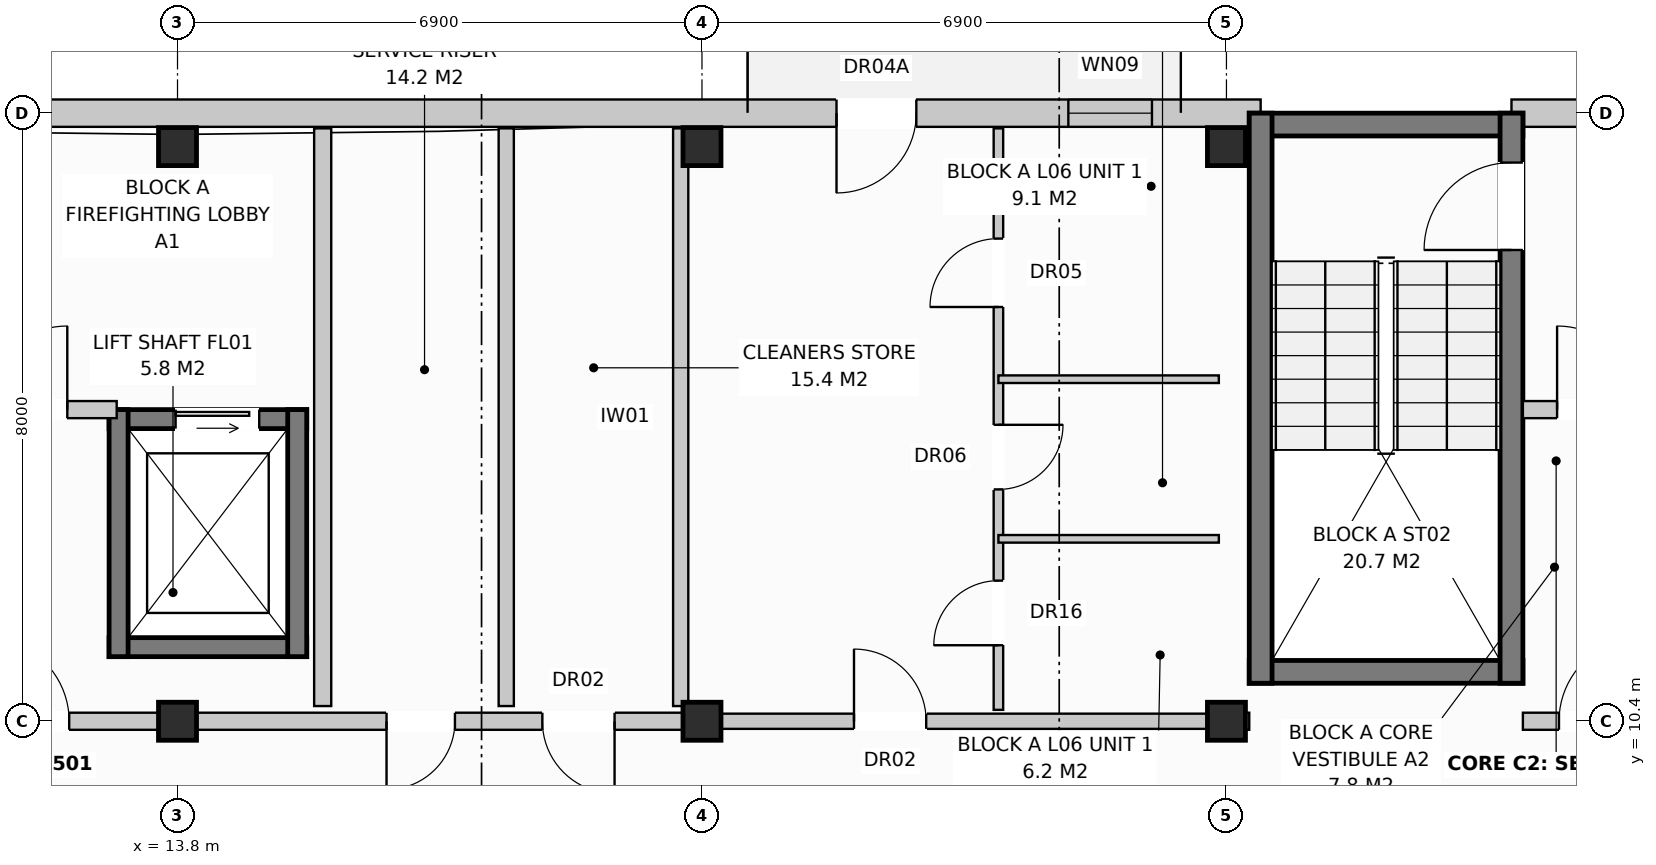
"""IFC4 building model, lengths in metres.
Left out: names, types, materials, properties, quantities, classifications, styles, units other than length and angle.
Written with IfcOpenShell. Run it as: python <this file> out.ifc"""

import sys

from ifc_helpers import new_model, si_unit, direction, frame, frame_2d, origin, origin_with_axes, origin_2d, place, context, subcontext, project, spatial, rectangle, extrude, element, fill, save


model = new_model("IFC4")
c1 = context("Model", 3, precision=1e-05, world=origin(), true_north=direction((0.0, 1.0)))
c2 = subcontext(c1, "Body", "Model", "MODEL_VIEW")
j1 = project(units=[si_unit("LENGTHUNIT", "METRE"), si_unit("PLANEANGLEUNIT", "RADIAN")], contexts=[c1])
p1 = place(None, origin())
s1 = spatial("IfcSite", under=j1, at=p1, CompositionType="ELEMENT")
p2 = place(p1, origin())
s2 = spatial("IfcBuilding", under=s1, at=p2, CompositionType="ELEMENT")
p3 = place(p2, frame((0.0, 0.0, 20.8)))
s3 = spatial("IfcBuildingStorey", under=s2, at=p3, CompositionType="ELEMENT", Elevation=20.8)
for number, where, z_axis, x_axis in (
    (1, (13.8, 10.4, 0.0), (0.0, 0.0, 1.0), (1.0, 0.0, 0.0)),
    (2, (13.8, 17.96, 0.0), (0.0, 0.0, 1.0), (1.0, 0.0, 0.0)),
    (3, (20.7, 10.4, 0.0), (0.0, 0.0, 1.0), (1.0, 0.0, 0.0)),
    (4, (20.7, 17.96, 0.0), (0.0, 0.0, 1.0), (1.0, 0.0, 0.0)),
    (5, (27.6, 10.4, 0.0), (0.0, 0.0, 1.0), (1.0, 0.0, 0.0)),
    (6, (27.6, 17.96, 0.0), (0.0, 0.0, 1.0), (1.0, 0.0, 0.0)),
):
    element("IfcColumn", number, at=place(p3, frame(where, z_axis=z_axis, x_axis=x_axis)), inside=s3, PredefinedType="COLUMN", context=c2, shape_type="SweptSolid", body=[
        extrude(rectangle(XDim=0.5, YDim=0.5, at=origin_2d()), origin(), (0.0, 0.0, 1.0), 3.2),
    ])
p4 = place(p3, frame((10.65, 18.4, 0.0), z_axis=(0.0, 0.0, 1.0), x_axis=(1.0, 0.0, 0.0)))
e7 = element("IfcWall", 7, at=p4, inside=s3, PredefinedType="STANDARD", context=c2, shape_type="SweptSolid", body=[
    extrude(rectangle(XDim=17.4, YDim=0.36, at=frame_2d((8.7, 0.0))), origin(), (0.0, 0.0, 1.0), 2.95),
])
p5 = place(p4, frame((11.82, 0.0, 0.0)))
e8 = element("IfcOpeningElement", 8, at=p5, cuts=e7, PredefinedType="OPENING", context=c2, shape_type="SweptSolid", body=[
    extrude(rectangle(XDim=1.05, YDim=2.12, at=frame_2d((0.525, 1.06))), frame((0.0, 0.192, 0.0), z_axis=(0.0, -1.0, 0.0), x_axis=(1.0, 0.0, 0.0)), (0.0, 0.0, 1.0), 0.384),
])
p6 = place(p4, frame((14.87, 0.0, 0.72)))
e9 = element("IfcOpeningElement", 9, at=p6, cuts=e7, PredefinedType="OPENING", context=c2, shape_type="SweptSolid", body=[
    extrude(rectangle(XDim=1.1, YDim=1.5, at=frame_2d((0.55, 0.75))), frame((0.0, 0.192, 0.0), z_axis=(0.0, -1.0, 0.0), x_axis=(1.0, 0.0, 0.0)), (0.0, 0.0, 1.0), 0.384),
])
p7 = place(p3, frame((31.35, 18.4, 0.0), z_axis=(0.0, 0.0, 1.0), x_axis=(1.0, 0.0, 0.0)))
e10 = element("IfcWall", 10, at=p7, inside=s3, PredefinedType="STANDARD", context=c2, shape_type="SweptSolid", body=[
    extrude(rectangle(XDim=23.68, YDim=0.36, at=frame_2d((11.84, 0.0))), origin(), (0.0, 0.0, 1.0), 2.95),
])
p8 = place(p7, frame((12.999, 0.0, 0.0)))
e11 = element("IfcOpeningElement", 11, at=p8, cuts=e10, PredefinedType="OPENING", context=c2, shape_type="SweptSolid", body=[
    extrude(rectangle(XDim=1.05, YDim=2.12, at=frame_2d((0.525, 1.06))), frame((0.0, 0.192, 0.0), z_axis=(0.0, -1.0, 0.0), x_axis=(1.0, 0.0, 0.0)), (0.0, 0.0, 1.0), 0.384),
])
p9 = place(p7, frame((10.87, 0.0, 0.8)))
e12 = element("IfcOpeningElement", 12, at=p9, cuts=e10, PredefinedType="OPENING", context=c2, shape_type="SweptSolid", body=[
    extrude(rectangle(XDim=1.9, YDim=1.85, at=frame_2d((0.95, 0.925))), frame((0.0, 0.192, 0.0), z_axis=(0.0, -1.0, 0.0), x_axis=(1.0, 0.0, 0.0)), (0.0, 0.0, 1.0), 0.384),
])
p10 = place(p7, frame((14.545, 0.0, 0.8)))
e13 = element("IfcOpeningElement", 13, at=p10, cuts=e10, PredefinedType="OPENING", context=c2, shape_type="SweptSolid", body=[
    extrude(rectangle(XDim=1.95, YDim=1.65, at=frame_2d((0.975, 0.825))), frame((0.0, 0.192, 0.0), z_axis=(0.0, -1.0, 0.0), x_axis=(1.0, 0.0, 0.0)), (0.0, 0.0, 1.0), 0.384),
])
p11 = place(p7, frame((20.67, 0.0, 0.72)))
e14 = element("IfcOpeningElement", 14, at=p11, cuts=e10, PredefinedType="OPENING", context=c2, shape_type="SweptSolid", body=[
    extrude(rectangle(XDim=1.1, YDim=1.5, at=frame_2d((0.55, 0.75))), frame((0.0, 0.192, 0.0), z_axis=(0.0, -1.0, 0.0), x_axis=(1.0, 0.0, 0.0)), (0.0, 0.0, 1.0), 0.384),
])
p12 = place(p3, frame((12.9, 14.375, 0.0), z_axis=(0.0, 0.0, 1.0), x_axis=(1.0, 0.0, 0.0)))
e15 = element("IfcWall", 15, at=p12, inside=s3, PredefinedType="SHEAR", context=c2, shape_type="SweptSolid", body=[
    extrude(rectangle(XDim=2.6, YDim=0.25, at=frame_2d((1.3, 0.0))), origin(), (0.0, 0.0, 1.0), 2.95),
])
p13 = place(p12, frame((0.875, 0.0, 0.0)))
e16 = element("IfcOpeningElement", 16, at=p13, cuts=e15, PredefinedType="OPENING", context=c2, shape_type="SweptSolid", body=[
    extrude(rectangle(XDim=1.1, YDim=2.1, at=frame_2d((0.55, 1.05))), frame((0.0, 0.137, 0.0), z_axis=(0.0, -1.0, 0.0), x_axis=(1.0, 0.0, 0.0)), (0.0, 0.0, 1.0), 0.274),
])
p14 = place(p3, frame((12.9, 11.375, 0.0), z_axis=(0.0, 0.0, 1.0), x_axis=(1.0, 0.0, 0.0)))
e17 = element("IfcWall", 17, at=p14, inside=s3, PredefinedType="SHEAR", context=c2, shape_type="SweptSolid", body=[
    extrude(rectangle(XDim=2.6, YDim=0.25, at=frame_2d((1.3, 0.0))), origin(), (0.0, 0.0, 1.0), 2.95),
])
for number, where, z_axis, x_axis in (
    (18, (13.025, 11.25, 0.0), (0.0, 0.0, 1.0), (0.0, 1.0, 0.0)),
    (19, (15.375, 11.25, 0.0), (0.0, 0.0, 1.0), (0.0, 1.0, 0.0)),
):
    element("IfcWall", number, at=place(p3, frame(where, z_axis=z_axis, x_axis=x_axis)), inside=s3, PredefinedType="SHEAR", context=c2, shape_type="SweptSolid", body=[
        extrude(rectangle(XDim=3.25, YDim=0.25, at=frame_2d((1.625, 0.0))), origin(), (0.0, 0.0, 1.0), 2.95),
    ])
p15 = place(p3, frame((15.71, 10.6, 0.0), z_axis=(0.0, 0.0, 1.0), x_axis=(0.0, 1.0, 0.0)))
e20 = element("IfcWall", 20, at=p15, inside=s3, PredefinedType="PARTITIONING", context=c2, shape_type="SweptSolid", body=[
    extrude(rectangle(XDim=7.6, YDim=0.225, at=frame_2d((3.8, 0.0))), origin(), (0.0, 0.0, 1.0), 2.59),
])
p16 = place(p3, frame((10.8, 14.5, 0.0), z_axis=(0.0, 0.0, 1.0), x_axis=(1.0, 0.0, 0.0)))
e21 = element("IfcWall", 21, at=p16, inside=s3, PredefinedType="PARTITIONING", context=c2, shape_type="SweptSolid", body=[
    extrude(rectangle(XDim=2.2, YDim=0.225, at=frame_2d((1.1, 0.0))), origin(), (0.0, 0.0, 1.0), 2.95),
])
p17 = place(p16, frame((0.45, 0.0, 0.0)))
e22 = element("IfcOpeningElement", 22, at=p17, cuts=e21, PredefinedType="OPENING", context=c2, shape_type="SweptSolid", body=[
    extrude(rectangle(XDim=1.1, YDim=2.15, at=frame_2d((0.55, 1.075))), frame((0.0, 0.125, 0.0), z_axis=(0.0, -1.0, 0.0), x_axis=(1.0, 0.0, 0.0)), (0.0, 0.0, 1.0), 0.249),
])
for number, where, z_axis, x_axis in (
    (23, (18.125, 10.6, 0.0), (0.0, 0.0, 1.0), (0.0, 1.0, 0.0)),
    (24, (20.42, 10.6, 0.0), (0.0, 0.0, 1.0), (0.0, 1.0, 0.0)),
):
    element("IfcWall", number, at=place(p3, frame(where, z_axis=z_axis, x_axis=x_axis)), inside=s3, PredefinedType="PARTITIONING", context=c2, shape_type="SweptSolid", body=[
        extrude(rectangle(XDim=7.6, YDim=0.2, at=frame_2d((3.8, 0.0))), origin(), (0.0, 0.0, 1.0), 2.95),
    ])
p18 = place(p3, frame((10.8, 10.4, 0.0), z_axis=(0.0, 0.0, 1.0), x_axis=(1.0, 0.0, 0.0)))
e25 = element("IfcWall", 25, at=p18, inside=s3, PredefinedType="PARTITIONING", context=c2, shape_type="SweptSolid", body=[
    extrude(rectangle(XDim=9.9, YDim=0.225, at=frame_2d((4.95, 0.0))), origin(), (0.0, 0.0, 1.0), 2.39),
])
p19 = place(p18, frame((0.475, 0.0, 0.0)))
e26 = element("IfcOpeningElement", 26, at=p19, cuts=e25, PredefinedType="OPENING", context=c2, shape_type="SweptSolid", body=[
    extrude(rectangle(XDim=1.1, YDim=2.15, at=frame_2d((0.55, 1.075))), frame((0.0, 0.125, 0.0), z_axis=(0.0, -1.0, 0.0), x_axis=(1.0, 0.0, 0.0)), (0.0, 0.0, 1.0), 0.249),
])
p20 = place(p18, frame((5.75, 0.0, 0.0)))
e27 = element("IfcOpeningElement", 27, at=p20, cuts=e25, PredefinedType="OPENING", context=c2, shape_type="SweptSolid", body=[
    extrude(rectangle(XDim=0.9, YDim=2.1, at=frame_2d((0.45, 1.05))), frame((0.0, 0.125, 0.0), z_axis=(0.0, -1.0, 0.0), x_axis=(1.0, 0.0, 0.0)), (0.0, 0.0, 1.0), 0.249),
])
p21 = place(p18, frame((7.8, 0.0, 0.0)))
e28 = element("IfcOpeningElement", 28, at=p21, cuts=e25, PredefinedType="OPENING", context=c2, shape_type="SweptSolid", body=[
    extrude(rectangle(XDim=0.95, YDim=2.15, at=frame_2d((0.475, 1.075))), frame((0.0, 0.125, 0.0), z_axis=(0.0, -1.0, 0.0), x_axis=(1.0, 0.0, 0.0)), (0.0, 0.0, 1.0), 0.249),
])
for number, where, z_axis, x_axis in (
    (29, (27.9, 18.25, 0.0), (0.0, 0.0, 1.0), (1.0, 0.0, 0.0)),
    (30, (27.9, 11.05, 0.0), (0.0, 0.0, 1.0), (1.0, 0.0, 0.0)),
):
    element("IfcWall", number, at=place(p3, frame(where, z_axis=z_axis, x_axis=x_axis)), inside=s3, PredefinedType="SHEAR", context=c2, shape_type="SweptSolid", body=[
        extrude(rectangle(XDim=3.6, YDim=0.3, at=frame_2d((1.8, 0.0))), origin(), (0.0, 0.0, 1.0), 2.95),
    ])
p22 = place(p3, frame((28.05, 10.9, 0.0), z_axis=(0.0, 0.0, 1.0), x_axis=(0.0, 1.0, 0.0)))
e31 = element("IfcWall", 31, at=p22, inside=s3, PredefinedType="SHEAR", context=c2, shape_type="SweptSolid", body=[
    extrude(rectangle(XDim=7.5, YDim=0.3, at=frame_2d((3.75, 0.0))), origin(), (0.0, 0.0, 1.0), 2.95),
])
p23 = place(p3, frame((31.35, 10.9, 0.0), z_axis=(0.0, 0.0, 1.0), x_axis=(0.0, 1.0, 0.0)))
e32 = element("IfcWall", 32, at=p23, inside=s3, PredefinedType="SHEAR", context=c2, shape_type="SweptSolid", body=[
    extrude(rectangle(XDim=7.5, YDim=0.3, at=frame_2d((3.75, 0.0))), origin(), (0.0, 0.0, 1.0), 2.95),
])
p24 = place(p23, frame((5.7, 0.0, 0.0)))
e33 = element("IfcOpeningElement", 33, at=p24, cuts=e32, PredefinedType="OPENING", context=c2, shape_type="SweptSolid", body=[
    extrude(rectangle(XDim=1.15, YDim=2.15, at=frame_2d((0.575, 1.075))), frame((0.0, 0.162, 0.0), z_axis=(0.0, -1.0, 0.0), x_axis=(1.0, 0.0, 0.0)), (0.0, 0.0, 1.0), 0.324),
])
p25 = place(p3, frame((31.5, 14.5, 0.0), z_axis=(0.0, 0.0, 1.0), x_axis=(1.0, 0.0, 0.0)))
e34 = element("IfcWall", 34, at=p25, inside=s3, PredefinedType="PARTITIONING", context=c2, shape_type="SweptSolid", body=[
    extrude(rectangle(XDim=2.2, YDim=0.225, at=frame_2d((1.1, 0.0))), origin(), (0.0, 0.0, 1.0), 2.95),
])
p26 = place(p25, frame((0.45, 0.0, 0.0)))
e35 = element("IfcOpeningElement", 35, at=p26, cuts=e34, PredefinedType="OPENING", context=c2, shape_type="SweptSolid", body=[
    extrude(rectangle(XDim=1.1, YDim=2.15, at=frame_2d((0.55, 1.075))), frame((0.0, 0.125, 0.0), z_axis=(0.0, -1.0, 0.0), x_axis=(1.0, 0.0, 0.0)), (0.0, 0.0, 1.0), 0.249),
])
p27 = place(p3, frame((27.6, 10.4, 0.0), z_axis=(0.0, 0.0, 1.0), x_axis=(1.0, 0.0, 0.0)))
e36 = element("IfcWall", 36, at=p27, inside=s3, PredefinedType="PARTITIONING", context=c2, shape_type="SweptSolid", body=[
    extrude(rectangle(XDim=0.3, YDim=0.225, at=frame_2d((0.15, 0.0))), origin(), (0.0, 0.0, 1.0), 2.95),
])
p28 = place(p3, frame((31.5, 10.4, 0.0), z_axis=(0.0, 0.0, 1.0), x_axis=(1.0, 0.0, 0.0)))
e37 = element("IfcWall", 37, at=p28, inside=s3, PredefinedType="PARTITIONING", context=c2, shape_type="SweptSolid", body=[
    extrude(rectangle(XDim=9.9, YDim=0.225, at=frame_2d((4.95, 0.0))), origin(), (0.0, 0.0, 1.0), 2.39),
])
p29 = place(p28, frame((0.475, 0.0, 0.0)))
e38 = element("IfcOpeningElement", 38, at=p29, cuts=e37, PredefinedType="OPENING", context=c2, shape_type="SweptSolid", body=[
    extrude(rectangle(XDim=1.1, YDim=2.15, at=frame_2d((0.55, 1.075))), frame((0.0, 0.125, 0.0), z_axis=(0.0, -1.0, 0.0), x_axis=(1.0, 0.0, 0.0)), (0.0, 0.0, 1.0), 0.249),
])
p30 = place(p28, frame((5.75, 0.0, 0.0)))
e39 = element("IfcOpeningElement", 39, at=p30, cuts=e37, PredefinedType="OPENING", context=c2, shape_type="SweptSolid", body=[
    extrude(rectangle(XDim=0.9, YDim=2.1, at=frame_2d((0.45, 1.05))), frame((0.0, 0.125, 0.0), z_axis=(0.0, -1.0, 0.0), x_axis=(1.0, 0.0, 0.0)), (0.0, 0.0, 1.0), 0.249),
])
p31 = place(p28, frame((7.8, 0.0, 0.0)))
e40 = element("IfcOpeningElement", 40, at=p31, cuts=e37, PredefinedType="OPENING", context=c2, shape_type="SweptSolid", body=[
    extrude(rectangle(XDim=0.95, YDim=2.15, at=frame_2d((0.475, 1.075))), frame((0.0, 0.125, 0.0), z_axis=(0.0, -1.0, 0.0), x_axis=(1.0, 0.0, 0.0)), (0.0, 0.0, 1.0), 0.249),
])
p32 = place(p3, frame((20.7, 10.4, 0.0), z_axis=(0.0, 0.0, 1.0), x_axis=(1.0, 0.0, 0.0)))
e41 = element("IfcWall", 41, at=p32, inside=s3, PredefinedType="PARTITIONING", context=c2, shape_type="SweptSolid", body=[
    extrude(rectangle(XDim=6.9, YDim=0.2, at=frame_2d((3.45, 0.0))), origin(), (0.0, 0.0, 1.0), 2.39),
])
p33 = place(p32, frame((2.0, 0.0, 0.0)))
e42 = element("IfcOpeningElement", 42, at=p33, cuts=e41, PredefinedType="OPENING", context=c2, shape_type="SweptSolid", body=[
    extrude(rectangle(XDim=0.95, YDim=2.15, at=frame_2d((0.475, 1.075))), frame((0.0, 0.112, 0.0), z_axis=(0.0, -1.0, 0.0), x_axis=(1.0, 0.0, 0.0)), (0.0, 0.0, 1.0), 0.224),
])
p34 = place(p3, frame((24.6, 10.55, 0.0), z_axis=(0.0, 0.0, 1.0), x_axis=(0.0, 1.0, 0.0)))
e43 = element("IfcWall", 43, at=p34, inside=s3, PredefinedType="PARTITIONING", context=c2, shape_type="SweptSolid", body=[
    extrude(rectangle(XDim=7.65, YDim=0.125, at=frame_2d((3.825, 0.0))), origin(), (0.0, 0.0, 1.0), 2.95),
])
p35 = place(p34, frame((0.85, 0.0, 0.0)))
e44 = element("IfcOpeningElement", 44, at=p35, cuts=e43, PredefinedType="OPENING", context=c2, shape_type="SweptSolid", body=[
    extrude(rectangle(XDim=0.85, YDim=2.1, at=frame_2d((0.425, 1.05))), frame((0.0, 0.074, 0.0), z_axis=(0.0, -1.0, 0.0), x_axis=(1.0, 0.0, 0.0)), (0.0, 0.0, 1.0), 0.149),
])
p36 = place(p34, frame((2.9, 0.0, 0.0)))
e45 = element("IfcOpeningElement", 45, at=p36, cuts=e43, PredefinedType="OPENING", context=c2, shape_type="SweptSolid", body=[
    extrude(rectangle(XDim=0.85, YDim=2.05, at=frame_2d((0.425, 1.025))), frame((0.0, 0.074, 0.0), z_axis=(0.0, -1.0, 0.0), x_axis=(1.0, 0.0, 0.0)), (0.0, 0.0, 1.0), 0.149),
])
p37 = place(p34, frame((5.3, 0.0, 0.0)))
e46 = element("IfcOpeningElement", 46, at=p37, cuts=e43, PredefinedType="OPENING", context=c2, shape_type="SweptSolid", body=[
    extrude(rectangle(XDim=0.9, YDim=2.1, at=frame_2d((0.45, 1.05))), frame((0.0, 0.074, 0.0), z_axis=(0.0, -1.0, 0.0), x_axis=(1.0, 0.0, 0.0)), (0.0, 0.0, 1.0), 0.149),
])
for number, where, z_axis, x_axis in (
    (47, (24.6, 12.8, 0.0), (0.0, 0.0, 1.0), (1.0, 0.0, 0.0)),
    (48, (24.6, 14.9, 0.0), (0.0, 0.0, 1.0), (1.0, 0.0, 0.0)),
):
    element("IfcWall", number, at=place(p3, frame(where, z_axis=z_axis, x_axis=x_axis)), inside=s3, PredefinedType="PARTITIONING", context=c2, shape_type="SweptSolid", body=[
        extrude(rectangle(XDim=2.9, YDim=0.1, at=frame_2d((1.45, 0.0))), origin(), (0.0, 0.0, 1.0), 2.95),
    ])
p38 = place(p5, frame((1.05, 0.0, 0.0), z_axis=(0.0, 0.0, 1.0), x_axis=(-1.0, 0.0, 0.0)))
e49 = element("IfcDoor", 49, at=p38, inside=s3, OperationType="SINGLE_SWING_LEFT", PredefinedType="DOOR", context=c2, shape_type="SweptSolid", body=[
    extrude(rectangle(XDim=1.05, YDim=2.12, at=frame_2d((0.525, 1.06))), frame((0.0, 0.025, 0.0), z_axis=(0.0, -1.0, 0.0), x_axis=(1.0, 0.0, 0.0)), (0.0, 0.0, 1.0), 0.05),
])
fill(e8, e49)
p39 = place(p6, origin_with_axes())
e50 = element("IfcWindow", 50, at=p39, inside=s3, PartitioningType="SINGLE_PANEL", PredefinedType="WINDOW", context=c2, shape_type="SweptSolid", body=[
    extrude(rectangle(XDim=1.1, YDim=1.5, at=frame_2d((0.55, 0.75))), frame((0.0, 0.03, 0.0), z_axis=(0.0, -1.0, 0.0), x_axis=(1.0, 0.0, 0.0)), (0.0, 0.0, 1.0), 0.06),
])
fill(e9, e50)
p40 = place(p13, origin_with_axes())
e51 = element("IfcDoor", 51, at=p40, inside=s3, OperationType="SLIDING_TO_LEFT", PredefinedType="DOOR", context=c2, shape_type="SweptSolid", body=[
    extrude(rectangle(XDim=1.1, YDim=2.1, at=frame_2d((0.55, 1.05))), frame((0.0, 0.025, 0.0), z_axis=(0.0, -1.0, 0.0), x_axis=(1.0, 0.0, 0.0)), (0.0, 0.0, 1.0), 0.05),
])
fill(e16, e51)
p41 = place(p17, origin_with_axes())
e52 = element("IfcDoor", 52, at=p41, inside=s3, OperationType="SINGLE_SWING_RIGHT", PredefinedType="DOOR", context=c2, shape_type="SweptSolid", body=[
    extrude(rectangle(XDim=1.1, YDim=2.15, at=frame_2d((0.55, 1.075))), frame((0.0, 0.025, 0.0), z_axis=(0.0, -1.0, 0.0), x_axis=(1.0, 0.0, 0.0)), (0.0, 0.0, 1.0), 0.05),
])
fill(e22, e52)
p42 = place(p19, origin_with_axes())
e53 = element("IfcDoor", 53, at=p42, inside=s3, OperationType="SINGLE_SWING_LEFT", PredefinedType="DOOR", context=c2, shape_type="SweptSolid", body=[
    extrude(rectangle(XDim=1.1, YDim=2.15, at=frame_2d((0.55, 1.075))), frame((0.0, 0.025, 0.0), z_axis=(0.0, -1.0, 0.0), x_axis=(1.0, 0.0, 0.0)), (0.0, 0.0, 1.0), 0.05),
])
fill(e26, e53)
p43 = place(p20, frame((0.9, 0.0, 0.0), z_axis=(0.0, 0.0, 1.0), x_axis=(-1.0, 0.0, 0.0)))
e54 = element("IfcDoor", 54, at=p43, inside=s3, OperationType="SINGLE_SWING_LEFT", PredefinedType="DOOR", context=c2, shape_type="SweptSolid", body=[
    extrude(rectangle(XDim=0.9, YDim=2.1, at=frame_2d((0.45, 1.05))), frame((0.0, 0.025, 0.0), z_axis=(0.0, -1.0, 0.0), x_axis=(1.0, 0.0, 0.0)), (0.0, 0.0, 1.0), 0.05),
])
fill(e27, e54)
p44 = place(p21, frame((0.95, 0.0, 0.0), z_axis=(0.0, 0.0, 1.0), x_axis=(-1.0, 0.0, 0.0)))
e55 = element("IfcDoor", 55, at=p44, inside=s3, OperationType="SINGLE_SWING_RIGHT", PredefinedType="DOOR", context=c2, shape_type="SweptSolid", body=[
    extrude(rectangle(XDim=0.95, YDim=2.15, at=frame_2d((0.475, 1.075))), frame((0.0, 0.025, 0.0), z_axis=(0.0, -1.0, 0.0), x_axis=(1.0, 0.0, 0.0)), (0.0, 0.0, 1.0), 0.05),
])
fill(e28, e55)
p45 = place(p24, origin_with_axes())
e56 = element("IfcDoor", 56, at=p45, inside=s3, OperationType="SINGLE_SWING_LEFT", PredefinedType="DOOR", context=c2, shape_type="SweptSolid", body=[
    extrude(rectangle(XDim=1.15, YDim=2.15, at=frame_2d((0.575, 1.075))), frame((0.0, 0.025, 0.0), z_axis=(0.0, -1.0, 0.0), x_axis=(1.0, 0.0, 0.0)), (0.0, 0.0, 1.0), 0.05),
])
fill(e33, e56)
p46 = place(p26, origin_with_axes())
e57 = element("IfcDoor", 57, at=p46, inside=s3, OperationType="SINGLE_SWING_LEFT", PredefinedType="DOOR", context=c2, shape_type="SweptSolid", body=[
    extrude(rectangle(XDim=1.1, YDim=2.15, at=frame_2d((0.55, 1.075))), frame((0.0, 0.025, 0.0), z_axis=(0.0, -1.0, 0.0), x_axis=(1.0, 0.0, 0.0)), (0.0, 0.0, 1.0), 0.05),
])
fill(e35, e57)
p47 = place(p29, origin_with_axes())
e58 = element("IfcDoor", 58, at=p47, inside=s3, OperationType="SINGLE_SWING_RIGHT", PredefinedType="DOOR", context=c2, shape_type="SweptSolid", body=[
    extrude(rectangle(XDim=1.1, YDim=2.15, at=frame_2d((0.55, 1.075))), frame((0.0, 0.025, 0.0), z_axis=(0.0, -1.0, 0.0), x_axis=(1.0, 0.0, 0.0)), (0.0, 0.0, 1.0), 0.05),
])
fill(e38, e58)
p48 = place(p33, origin_with_axes())
e59 = element("IfcDoor", 59, at=p48, inside=s3, OperationType="SINGLE_SWING_LEFT", PredefinedType="DOOR", context=c2, shape_type="SweptSolid", body=[
    extrude(rectangle(XDim=0.95, YDim=2.15, at=frame_2d((0.475, 1.075))), frame((0.0, 0.025, 0.0), z_axis=(0.0, -1.0, 0.0), x_axis=(1.0, 0.0, 0.0)), (0.0, 0.0, 1.0), 0.05),
])
fill(e42, e59)
p49 = place(p35, origin_with_axes())
e60 = element("IfcDoor", 60, at=p49, inside=s3, OperationType="SINGLE_SWING_LEFT", PredefinedType="DOOR", context=c2, shape_type="SweptSolid", body=[
    extrude(rectangle(XDim=0.85, YDim=2.1, at=frame_2d((0.425, 1.05))), frame((0.0, 0.025, 0.0), z_axis=(0.0, -1.0, 0.0), x_axis=(1.0, 0.0, 0.0)), (0.0, 0.0, 1.0), 0.05),
])
fill(e44, e60)
p50 = place(p36, frame((0.85, 0.0, 0.0), z_axis=(0.0, 0.0, 1.0), x_axis=(-1.0, 0.0, 0.0)))
e61 = element("IfcDoor", 61, at=p50, inside=s3, OperationType="SINGLE_SWING_RIGHT", PredefinedType="DOOR", context=c2, shape_type="SweptSolid", body=[
    extrude(rectangle(XDim=0.85, YDim=2.05, at=frame_2d((0.425, 1.025))), frame((0.0, 0.025, 0.0), z_axis=(0.0, -1.0, 0.0), x_axis=(1.0, 0.0, 0.0)), (0.0, 0.0, 1.0), 0.05),
])
fill(e45, e61)
p51 = place(p37, origin_with_axes())
e62 = element("IfcDoor", 62, at=p51, inside=s3, OperationType="SINGLE_SWING_LEFT", PredefinedType="DOOR", context=c2, shape_type="SweptSolid", body=[
    extrude(rectangle(XDim=0.9, YDim=2.1, at=frame_2d((0.45, 1.05))), frame((0.0, 0.025, 0.0), z_axis=(0.0, -1.0, 0.0), x_axis=(1.0, 0.0, 0.0)), (0.0, 0.0, 1.0), 0.05),
])
fill(e46, e62)
save(model, sys.argv[1])
